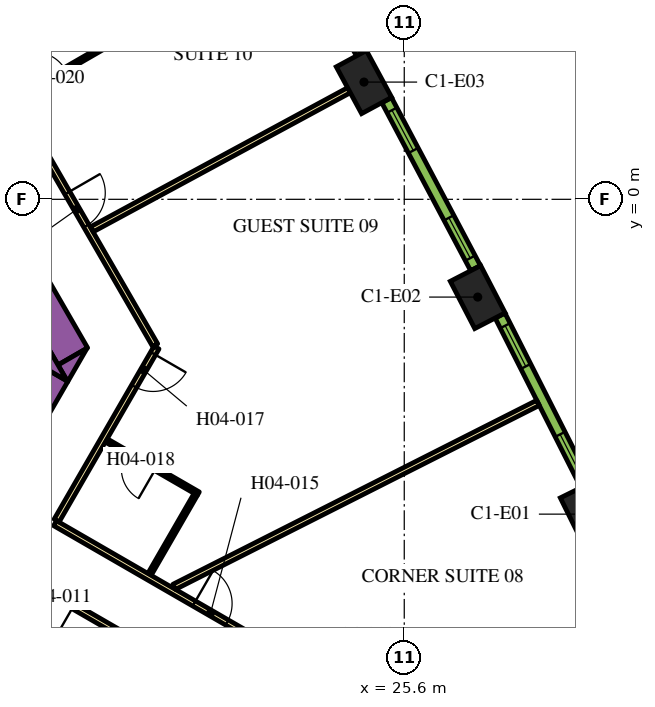
"""IFC4 building model, lengths in metres.
Left out: names, types, materials, properties, quantities, classifications, styles, units other than length and angle.
Written with IfcOpenShell. Run it as: python <this file> out.ifc"""

import sys

from ifc_helpers import new_model, si_unit, direction, frame, frame_2d, origin, origin_2d, place, context, subcontext, project, spatial, polyline, rectangle, outline, extrude, element, fill, save


model = new_model("IFC4")
c1 = context("Model", 3, precision=1e-05, world=origin(), true_north=direction((0.0, 1.0)))
c2 = subcontext(c1, "Body", "Model", "MODEL_VIEW")
j1 = project(units=[si_unit("LENGTHUNIT", "METRE"), si_unit("PLANEANGLEUNIT", "RADIAN")], contexts=[c1])
p1 = place(None, origin())
s1 = spatial("IfcSite", under=j1, at=p1, CompositionType="ELEMENT")
p2 = place(p1, origin())
s2 = spatial("IfcBuilding", under=s1, at=p2, CompositionType="ELEMENT")
p3 = place(p2, frame((0.0, 0.0, 62.7)))
s3 = spatial("IfcBuildingStorey", under=s2, at=p3, CompositionType="ELEMENT", Elevation=62.7)
for number, where, z_axis, x_axis in (
    (1, (30.421, -8.284, 0.0), (0.0, 0.0, 1.0), (-0.443, 0.897, 0.0)),
    (2, (27.533, -2.572, 0.0), (0.0, 0.0, 1.0), (-0.459, 0.888, 0.0)),
    (3, (24.54, 3.085, 0.0), (0.0, 0.0, 1.0), (-0.476, 0.88, 0.0)),
):
    element("IfcColumn", number, at=place(p3, frame(where, z_axis=z_axis, x_axis=x_axis)), inside=s3, PredefinedType="COLUMN", context=c2, shape_type="SweptSolid", body=[
        extrude(rectangle(XDim=1.4, YDim=0.9, at=origin_2d()), origin(), (0.0, 0.0, 1.0), 3.9),
    ])
p4 = place(p3, frame((6.776, 13.364, 0.0), z_axis=(0.0, 0.0, 1.0), x_axis=(0.500004177138, -0.8660229921, 0.0)))
e4 = element("IfcWall", 4, at=p4, inside=s3, PredefinedType="SOLIDWALL", context=c2, shape_type="SweptSolid", body=[
    extrude(rectangle(XDim=20.204, YDim=0.9, at=frame_2d((10.102, 0.0))), origin(), (0.0, 0.0, 1.0), 3.9),
])
p5 = place(p3, origin())
e5 = element("IfcWall", 5, at=p5, inside=s3, PredefinedType="SOLIDWALL", context=c2, shape_type="SweptSolid", body=[
    extrude(outline(polyline([(16.743, -4.8), (16.489, -4.36), (17.251, -3.92), (16.743, -4.8)])), origin(), (0.0, 0.0, 1.0), 3.9),
])
p6 = place(p3, frame((11.695, -12.644, 0.0), z_axis=(0.0, 0.0, 1.0), x_axis=(0.500010229568, 0.86601949766, 0.0)))
e6 = element("IfcWall", 6, at=p6, inside=s3, PredefinedType="SOLIDWALL", context=c2, shape_type="SweptSolid", body=[
    extrude(rectangle(XDim=9.326, YDim=0.9, at=frame_2d((4.663, 0.0))), origin(), (0.0, 0.0, 1.0), 3.9),
])
e7 = element("IfcWall", 7, at=p5, inside=s3, PredefinedType="SOLIDWALL", context=c2, shape_type="SweptSolid", body=[
    extrude(outline(polyline([(16.223, -3.9), (16.732, -4.78), (15.969, -4.34), (16.223, -3.9)])), origin(), (0.0, 0.0, 1.0), 3.9),
])
p7 = place(p3, frame((16.412, -8.523, 0.0), z_axis=(0.0, 0.0, 1.0), x_axis=(0.866022197818, -0.500005552856, 0.0)))
e8 = element("IfcWall", 8, at=p7, inside=s3, PredefinedType="PARTITIONING", context=c2, shape_type="SweptSolid", body=[
    extrude(rectangle(XDim=16.224, YDim=0.15, at=frame_2d((8.112, 0.0))), origin(), (0.0, 0.0, 1.0), 2.75),
])
p8 = place(p7, frame((4.223, 0.0, 0.0)))
e9 = element("IfcOpeningElement", 9, at=p8, cuts=e8, PredefinedType="OPENING", context=c2, shape_type="SweptSolid", body=[
    extrude(rectangle(XDim=1.0, YDim=2.1, at=frame_2d((0.5, 1.05))), frame((0.0, 0.085, 0.0), z_axis=(0.0, -1.0, 0.0), x_axis=(1.0, 0.0, 0.0)), (0.0, 0.0, 1.0), 0.17),
])
p9 = place(p3, frame((19.081, -3.9, 0.0), z_axis=(0.0, 0.0, 1.0), x_axis=(-0.499974327079, -0.866040225545, 0.0)))
e10 = element("IfcWall", 10, at=p9, inside=s3, PredefinedType="PARTITIONING", context=c2, shape_type="SweptSolid", body=[
    extrude(rectangle(XDim=5.258, YDim=0.15, at=frame_2d((2.629, 0.0))), origin(), (0.0, 0.0, 1.0), 2.75),
])
p10 = place(p9, frame((0.18, 0.0, 0.0)))
e11 = element("IfcOpeningElement", 11, at=p10, cuts=e10, PredefinedType="OPENING", context=c2, shape_type="SweptSolid", body=[
    extrude(rectangle(XDim=1.0, YDim=2.1, at=frame_2d((0.5, 1.05))), frame((0.0, 0.085, 0.0), z_axis=(0.0, -1.0, 0.0), x_axis=(1.0, 0.0, 0.0)), (0.0, 0.0, 1.0), 0.17),
])
p11 = place(p3, frame((6.163, 18.475, 0.0), z_axis=(0.0, 0.0, 1.0), x_axis=(0.500001317485, -0.866024643133, 0.0)))
e12 = element("IfcWall", 12, at=p11, inside=s3, PredefinedType="PARTITIONING", context=c2, shape_type="SweptSolid", body=[
    extrude(rectangle(XDim=25.767, YDim=0.15, at=frame_2d((12.883, 0.0))), origin(), (0.0, 0.0, 1.0), 2.75),
])
p12 = place(p11, frame((21.138, 0.0, 0.0)))
e13 = element("IfcOpeningElement", 13, at=p12, cuts=e12, PredefinedType="OPENING", context=c2, shape_type="SweptSolid", body=[
    extrude(rectangle(XDim=1.0, YDim=2.1, at=frame_2d((0.5, 1.05))), frame((0.0, 0.085, 0.0), z_axis=(0.0, -1.0, 0.0), x_axis=(1.0, 0.0, 0.0)), (0.0, 0.0, 1.0), 0.17),
])
p13 = place(p11, frame((9.948, 0.0, 0.0)))
e14 = element("IfcOpeningElement", 14, at=p13, cuts=e12, PredefinedType="OPENING", context=c2, shape_type="SweptSolid", body=[
    extrude(rectangle(XDim=1.1, YDim=2.1, at=frame_2d((0.55, 1.05))), frame((0.0, 0.085, 0.0), z_axis=(0.0, -1.0, 0.0), x_axis=(1.0, 0.0, 0.0)), (0.0, 0.0, 1.0), 0.17),
])
p14 = place(p11, frame((8.641, 0.0, 0.0)))
e15 = element("IfcOpeningElement", 15, at=p14, cuts=e12, PredefinedType="OPENING", context=c2, shape_type="SweptSolid", body=[
    extrude(rectangle(XDim=1.0, YDim=2.1, at=frame_2d((0.5, 1.05))), frame((0.0, 0.085, 0.0), z_axis=(0.0, -1.0, 0.0), x_axis=(1.0, 0.0, 0.0)), (0.0, 0.0, 1.0), 0.17),
])
p15 = place(p11, frame((0.18, 0.0, 0.0)))
e16 = element("IfcOpeningElement", 16, at=p15, cuts=e12, PredefinedType="OPENING", context=c2, shape_type="SweptSolid", body=[
    extrude(rectangle(XDim=1.0, YDim=2.1, at=frame_2d((0.5, 1.05))), frame((0.0, 0.085, 0.0), z_axis=(0.0, -1.0, 0.0), x_axis=(1.0, 0.0, 0.0)), (0.0, 0.0, 1.0), 0.17),
])
p16 = place(p3, frame((29.638, -18.064, 0.0), z_axis=(0.0, 0.0, 1.0), x_axis=(-0.866026175601, 0.499998663172, 0.0)))
e17 = element("IfcWall", 17, at=p16, inside=s3, PredefinedType="PARTITIONING", context=c2, shape_type="SweptSolid", body=[
    extrude(rectangle(XDim=16.144, YDim=0.15, at=frame_2d((8.072, 0.0))), origin(), (0.0, 0.0, 1.0), 2.75),
])
p17 = place(p16, frame((14.714, 0.0, 0.0)))
e18 = element("IfcOpeningElement", 18, at=p17, cuts=e17, PredefinedType="OPENING", context=c2, shape_type="SweptSolid", body=[
    extrude(rectangle(XDim=1.0, YDim=2.1, at=frame_2d((0.5, 1.05))), frame((0.0, 0.085, 0.0), z_axis=(0.0, -1.0, 0.0), x_axis=(1.0, 0.0, 0.0)), (0.0, 0.0, 1.0), 0.17),
])
p18 = place(p16, frame((7.275, 0.0, 0.0)))
e19 = element("IfcOpeningElement", 19, at=p18, cuts=e17, PredefinedType="OPENING", context=c2, shape_type="SweptSolid", body=[
    extrude(rectangle(XDim=1.0, YDim=2.1, at=frame_2d((0.5, 1.05))), frame((0.0, 0.085, 0.0), z_axis=(0.0, -1.0, 0.0), x_axis=(1.0, 0.0, 0.0)), (0.0, 0.0, 1.0), 0.17),
])
p19 = place(p3, frame((24.145, 2.871, 0.0), z_axis=(0.0, 0.0, 1.0), x_axis=(-0.879551725039, -0.475803281809, 0.0)))
e20 = element("IfcWall", 20, at=p19, inside=s3, PredefinedType="PARTITIONING", context=c2, shape_type="SweptSolid", body=[
    extrude(rectangle(XDim=7.688, YDim=0.15, at=frame_2d((3.844, 0.0))), origin(), (0.0, 0.0, 1.0), 2.75),
])
p20 = place(p3, frame((29.12, -5.356, 0.0), z_axis=(0.0, 0.0, 1.0), x_axis=(-0.892401965553, -0.451241323327, 0.0)))
e21 = element("IfcWall", 21, at=p20, inside=s3, PredefinedType="PARTITIONING", context=c2, shape_type="SweptSolid", body=[
    extrude(rectangle(XDim=10.729, YDim=0.15, at=frame_2d((5.364, 0.0))), origin(), (0.0, 0.0, 1.0), 2.75),
])
p21 = place(p3, frame((20.182, -7.743, 0.0), z_axis=(0.0, 0.0, 1.0), x_axis=(-0.866034573852, 0.49998411664, 0.0)))
e22 = element("IfcWall", 22, at=p21, inside=s3, PredefinedType="PARTITIONING", context=c2, shape_type="SweptSolid", body=[
    extrude(rectangle(XDim=2.8, YDim=0.1, at=frame_2d((1.4, 0.0))), origin(), (0.0, 0.0, 1.0), 2.75),
])
p22 = place(p21, frame((1.3, 0.0, 0.0)))
e23 = element("IfcOpeningElement", 23, at=p22, cuts=e22, PredefinedType="OPENING", context=c2, shape_type="SweptSolid", body=[
    extrude(rectangle(XDim=0.9, YDim=2.1, at=frame_2d((0.45, 1.05))), frame((0.0, 0.06, 0.0), z_axis=(0.0, -1.0, 0.0), x_axis=(1.0, 0.0, 0.0)), (0.0, 0.0, 1.0), 0.12),
])
p23 = place(p3, frame((20.109, -7.771, 0.0), z_axis=(0.0, 0.0, 1.0), x_axis=(-0.500077573772, -0.865980611914, 0.0)))
e24 = element("IfcWall", 24, at=p23, inside=s3, PredefinedType="PARTITIONING", context=c2, shape_type="SweptSolid", body=[
    extrude(rectangle(XDim=2.42, YDim=0.1, at=frame_2d((1.21, 0.0))), origin(), (0.0, 0.0, 1.0), 2.75),
])
p24 = place(p3, frame((15.376, 2.668, 0.0), z_axis=(0.0, 0.0, 1.0), x_axis=(0.866036505625, 0.499980770555, 0.0)))
e25 = element("IfcWall", 25, at=p24, inside=s3, PredefinedType="PARTITIONING", context=c2, shape_type="SweptSolid", body=[
    extrude(rectangle(XDim=2.7, YDim=0.1, at=frame_2d((1.35, 0.0))), origin(), (0.0, 0.0, 1.0), 2.75),
])
p25 = place(p24, frame((0.6, 0.0, 0.0)))
e26 = element("IfcOpeningElement", 26, at=p25, cuts=e25, PredefinedType="OPENING", context=c2, shape_type="SweptSolid", body=[
    extrude(rectangle(XDim=0.9, YDim=2.1, at=frame_2d((0.45, 1.05))), frame((0.0, 0.06, 0.0), z_axis=(0.0, -1.0, 0.0), x_axis=(1.0, 0.0, 0.0)), (0.0, 0.0, 1.0), 0.12),
])
p26 = place(p3, frame((30.377, -7.521, 0.0), z_axis=(0.0, 0.0, 1.0), x_axis=(-0.451233929645, 0.892405704115, 0.0)))
e27 = element("IfcWall", 27, at=p26, inside=s3, PredefinedType="SOLIDWALL", context=c2, shape_type="SweptSolid", body=[
    extrude(rectangle(XDim=4.998, YDim=0.29, at=frame_2d((2.499, 0.0))), origin(), (0.0, 0.0, 1.0), 3.65),
])
p27 = place(p26, frame((0.297, 0.0, 0.9)))
e28 = element("IfcOpeningElement", 28, at=p27, cuts=e27, PredefinedType="OPENING", context=c2, shape_type="SweptSolid", body=[
    extrude(rectangle(XDim=1.2, YDim=2.15, at=frame_2d((0.6, 1.075))), frame((0.0, 0.155, 0.0), z_axis=(0.0, -1.0, 0.0), x_axis=(1.0, 0.0, 0.0)), (0.0, 0.0, 1.0), 0.31),
])
p28 = place(p26, frame((3.501, 0.0, 0.9)))
e29 = element("IfcOpeningElement", 29, at=p28, cuts=e27, PredefinedType="OPENING", context=c2, shape_type="SweptSolid", body=[
    extrude(rectangle(XDim=1.2, YDim=2.15, at=frame_2d((0.6, 1.075))), frame((0.0, 0.155, 0.0), z_axis=(0.0, -1.0, 0.0), x_axis=(1.0, 0.0, 0.0)), (0.0, 0.0, 1.0), 0.31),
])
p29 = place(p3, frame((27.475, -1.81, 0.0), z_axis=(0.0, 0.0, 1.0), x_axis=(-0.467629620899, 0.883924509026, 0.0)))
e30 = element("IfcWall", 30, at=p29, inside=s3, PredefinedType="SOLIDWALL", context=c2, shape_type="SweptSolid", body=[
    extrude(rectangle(XDim=4.998, YDim=0.29, at=frame_2d((2.499, 0.0))), origin(), (0.0, 0.0, 1.0), 3.65),
])
p30 = place(p29, frame((0.297, 0.0, 0.9)))
e31 = element("IfcOpeningElement", 31, at=p30, cuts=e30, PredefinedType="OPENING", context=c2, shape_type="SweptSolid", body=[
    extrude(rectangle(XDim=1.2, YDim=2.15, at=frame_2d((0.6, 1.075))), frame((0.0, 0.155, 0.0), z_axis=(0.0, -1.0, 0.0), x_axis=(1.0, 0.0, 0.0)), (0.0, 0.0, 1.0), 0.31),
])
p31 = place(p29, frame((3.501, 0.0, 0.9)))
e32 = element("IfcOpeningElement", 32, at=p31, cuts=e30, PredefinedType="OPENING", context=c2, shape_type="SweptSolid", body=[
    extrude(rectangle(XDim=1.2, YDim=2.15, at=frame_2d((0.6, 1.075))), frame((0.0, 0.155, 0.0), z_axis=(0.0, -1.0, 0.0), x_axis=(1.0, 0.0, 0.0)), (0.0, 0.0, 1.0), 0.31),
])
p32 = place(p3, frame((24.468, 3.846, 0.0), z_axis=(0.0, 0.0, 1.0), x_axis=(-0.483912572871, 0.875116347589, 0.0)))
e33 = element("IfcWall", 33, at=p32, inside=s3, PredefinedType="SOLIDWALL", context=c2, shape_type="SweptSolid", body=[
    extrude(rectangle(XDim=4.998, YDim=0.29, at=frame_2d((2.499, 0.0))), origin(), (0.0, 0.0, 1.0), 3.65),
])
p33 = place(p32, frame((0.297, 0.0, 0.9)))
e34 = element("IfcOpeningElement", 34, at=p33, cuts=e33, PredefinedType="OPENING", context=c2, shape_type="SweptSolid", body=[
    extrude(rectangle(XDim=1.2, YDim=2.15, at=frame_2d((0.6, 1.075))), frame((0.0, 0.155, 0.0), z_axis=(0.0, -1.0, 0.0), x_axis=(1.0, 0.0, 0.0)), (0.0, 0.0, 1.0), 0.31),
])
p34 = place(p32, frame((3.501, 0.0, 0.9)))
e35 = element("IfcOpeningElement", 35, at=p34, cuts=e33, PredefinedType="OPENING", context=c2, shape_type="SweptSolid", body=[
    extrude(rectangle(XDim=1.2, YDim=2.15, at=frame_2d((0.6, 1.075))), frame((0.0, 0.155, 0.0), z_axis=(0.0, -1.0, 0.0), x_axis=(1.0, 0.0, 0.0)), (0.0, 0.0, 1.0), 0.31),
])
p35 = place(p17, origin())
e36 = element("IfcDoor", 36, at=p35, inside=s3, OperationType="SINGLE_SWING_RIGHT", PredefinedType="DOOR", context=c2, shape_type="SweptSolid", body=[
    extrude(rectangle(XDim=1.0, YDim=2.1, at=frame_2d((0.5, 1.05))), frame((0.0, 0.025, 0.0), z_axis=(0.0, -1.0, 0.0), x_axis=(1.0, 0.0, 0.0)), (0.0, 0.0, 1.0), 0.05),
])
fill(e18, e36)
p36 = place(p8, origin())
e37 = element("IfcDoor", 37, at=p36, inside=s3, OperationType="SINGLE_SWING_LEFT", PredefinedType="DOOR", context=c2, shape_type="SweptSolid", body=[
    extrude(rectangle(XDim=1.0, YDim=2.1, at=frame_2d((0.5, 1.05))), frame((0.0, 0.025, 0.0), z_axis=(0.0, -1.0, 0.0), x_axis=(1.0, 0.0, 0.0)), (0.0, 0.0, 1.0), 0.05),
])
fill(e9, e37)
p37 = place(p10, origin())
e38 = element("IfcDoor", 38, at=p37, inside=s3, OperationType="SINGLE_SWING_LEFT", PredefinedType="DOOR", context=c2, shape_type="SweptSolid", body=[
    extrude(rectangle(XDim=1.0, YDim=2.1, at=frame_2d((0.5, 1.05))), frame((0.0, 0.025, 0.0), z_axis=(0.0, -1.0, 0.0), x_axis=(1.0, 0.0, 0.0)), (0.0, 0.0, 1.0), 0.05),
])
fill(e11, e38)
p38 = place(p22, origin())
e39 = element("IfcDoor", 39, at=p38, inside=s3, OperationType="SINGLE_SWING_RIGHT", PredefinedType="DOOR", context=c2, shape_type="SweptSolid", body=[
    extrude(rectangle(XDim=0.9, YDim=2.1, at=frame_2d((0.45, 1.05))), frame((0.0, 0.025, 0.0), z_axis=(0.0, -1.0, 0.0), x_axis=(1.0, 0.0, 0.0)), (0.0, 0.0, 1.0), 0.05),
])
fill(e23, e39)
p39 = place(p12, origin())
e40 = element("IfcDoor", 40, at=p39, inside=s3, OperationType="SINGLE_SWING_RIGHT", PredefinedType="DOOR", context=c2, shape_type="SweptSolid", body=[
    extrude(rectangle(XDim=1.0, YDim=2.1, at=frame_2d((0.5, 1.05))), frame((0.0, 0.025, 0.0), z_axis=(0.0, -1.0, 0.0), x_axis=(1.0, 0.0, 0.0)), (0.0, 0.0, 1.0), 0.05),
])
fill(e13, e40)
p40 = place(p25, origin())
e41 = element("IfcDoor", 41, at=p40, inside=s3, OperationType="SINGLE_SWING_LEFT", PredefinedType="DOOR", context=c2, shape_type="SweptSolid", body=[
    extrude(rectangle(XDim=0.9, YDim=2.1, at=frame_2d((0.45, 1.05))), frame((0.0, 0.025, 0.0), z_axis=(0.0, -1.0, 0.0), x_axis=(1.0, 0.0, 0.0)), (0.0, 0.0, 1.0), 0.05),
])
fill(e26, e41)
p41 = place(p27, origin())
e42 = element("IfcWindow", 42, at=p41, inside=s3, PartitioningType="DOUBLE_PANEL_VERTICAL", PredefinedType="WINDOW", context=c2, shape_type="SweptSolid", body=[
    extrude(rectangle(XDim=1.2, YDim=2.15, at=frame_2d((0.6, 1.075))), frame((0.0, 0.015, 0.0), z_axis=(0.0, -1.0, 0.0), x_axis=(1.0, 0.0, 0.0)), (0.0, 0.0, 1.0), 0.06),
])
fill(e28, e42)
p42 = place(p28, origin())
e43 = element("IfcWindow", 43, at=p42, inside=s3, PartitioningType="DOUBLE_PANEL_VERTICAL", PredefinedType="WINDOW", context=c2, shape_type="SweptSolid", body=[
    extrude(rectangle(XDim=1.2, YDim=2.15, at=frame_2d((0.6, 1.075))), frame((0.0, 0.015, 0.0), z_axis=(0.0, -1.0, 0.0), x_axis=(1.0, 0.0, 0.0)), (0.0, 0.0, 1.0), 0.06),
])
fill(e29, e43)
p43 = place(p30, origin())
e44 = element("IfcWindow", 44, at=p43, inside=s3, PartitioningType="DOUBLE_PANEL_VERTICAL", PredefinedType="WINDOW", context=c2, shape_type="SweptSolid", body=[
    extrude(rectangle(XDim=1.2, YDim=2.15, at=frame_2d((0.6, 1.075))), frame((0.0, 0.015, 0.0), z_axis=(0.0, -1.0, 0.0), x_axis=(1.0, 0.0, 0.0)), (0.0, 0.0, 1.0), 0.06),
])
fill(e31, e44)
p44 = place(p31, origin())
e45 = element("IfcWindow", 45, at=p44, inside=s3, PartitioningType="DOUBLE_PANEL_VERTICAL", PredefinedType="WINDOW", context=c2, shape_type="SweptSolid", body=[
    extrude(rectangle(XDim=1.2, YDim=2.15, at=frame_2d((0.6, 1.075))), frame((0.0, 0.015, 0.0), z_axis=(0.0, -1.0, 0.0), x_axis=(1.0, 0.0, 0.0)), (0.0, 0.0, 1.0), 0.06),
])
fill(e32, e45)
save(model, sys.argv[1])
